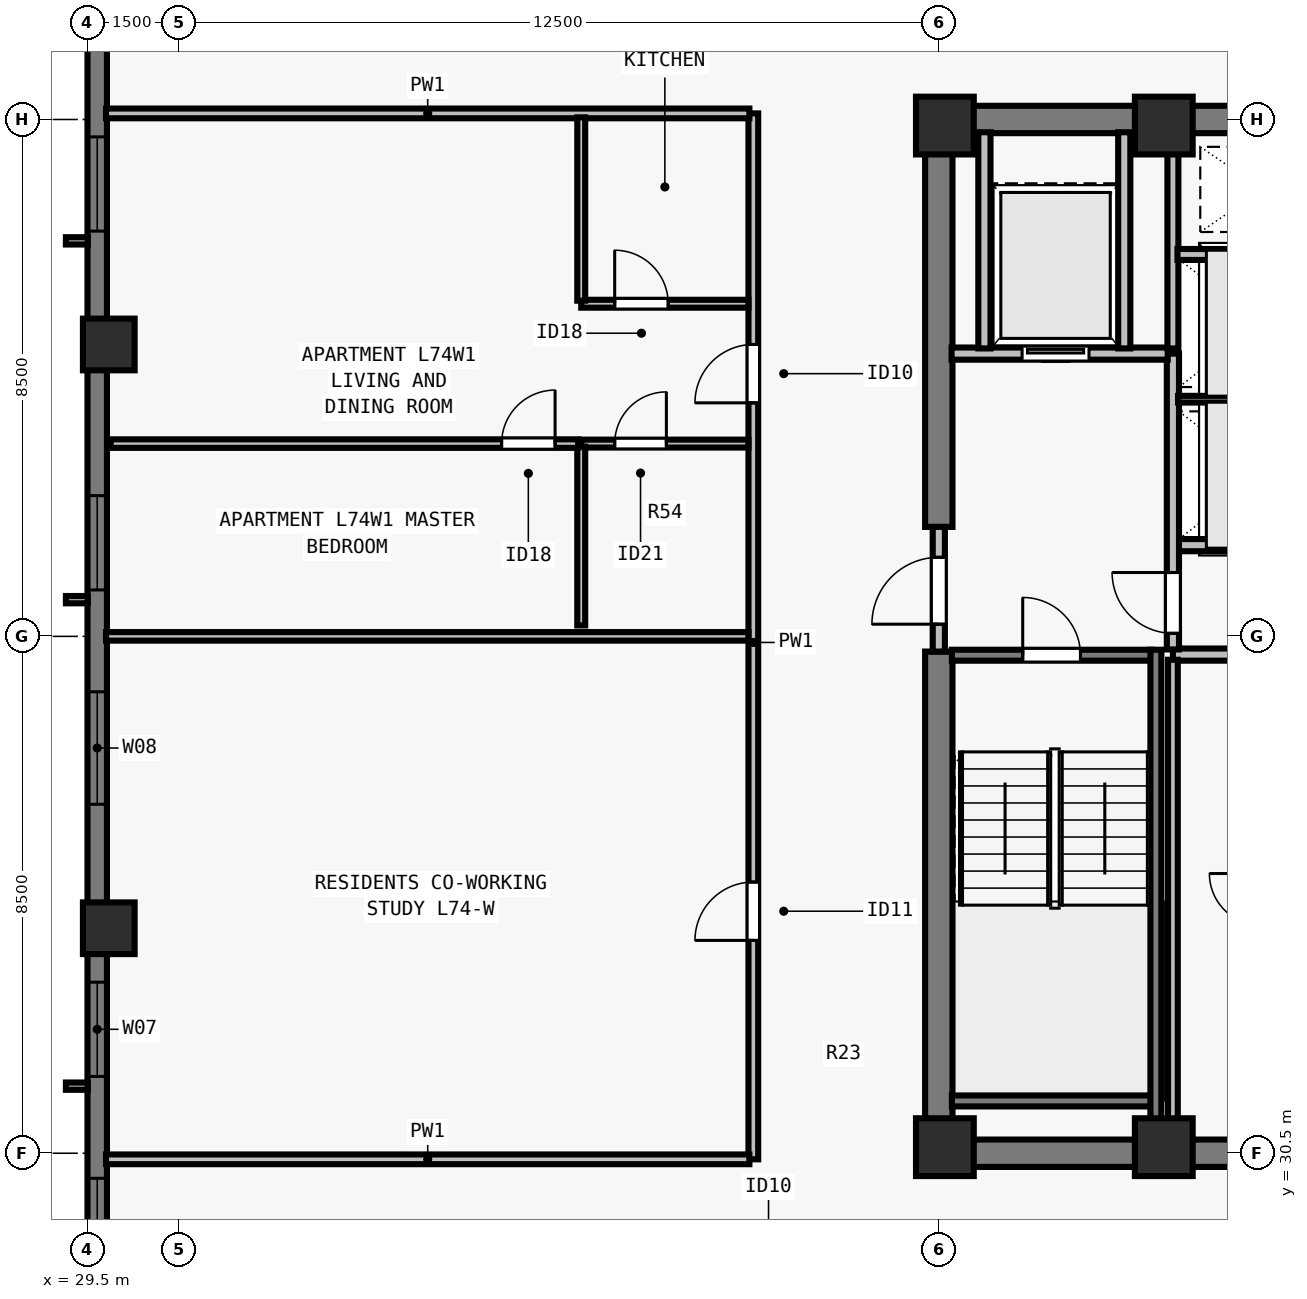
"""IFC4 building model, lengths in metres.
Left out: names, types, materials, properties, quantities, classifications, styles, units other than length and angle.
Written with IfcOpenShell. Run it as: python <this file> out.ifc"""

import sys

from ifc_helpers import new_model, si_unit, direction, frame, frame_2d, origin, origin_2d, place, context, subcontext, project, spatial, rectangle, extrude, element, fill, save


model = new_model("IFC4")
c1 = context("Model", 3, precision=1e-05, world=origin(), true_north=direction((0.0, 1.0)))
c2 = subcontext(c1, "Body", "Model", "MODEL_VIEW")
j1 = project(units=[si_unit("LENGTHUNIT", "METRE"), si_unit("PLANEANGLEUNIT", "RADIAN")], contexts=[c1])
p1 = place(None, origin())
s1 = spatial("IfcSite", under=j1, at=p1, CompositionType="ELEMENT")
p2 = place(p1, origin())
s2 = spatial("IfcBuilding", under=s1, at=p2, CompositionType="ELEMENT")
p3 = place(p2, frame((0.0, 0.0, 269.0)))
s3 = spatial("IfcBuildingStorey", under=s2, at=p3, CompositionType="ELEMENT", Elevation=269.0)
for number, where, z_axis, x_axis in (
    (1, (43.6, 30.6, 0.0), (0.0, 0.0, 1.0), (1.0, 0.0, 0.0)),
    (2, (47.2, 30.6, 0.0), (0.0, 0.0, 1.0), (1.0, 0.0, 0.0)),
    (3, (43.6, 47.4, 0.0), (0.0, 0.0, 1.0), (1.0, 0.0, 0.0)),
    (4, (47.2, 47.4, 0.0), (0.0, 0.0, 1.0), (1.0, 0.0, 0.0)),
):
    element("IfcColumn", number, at=place(p3, frame(where, z_axis=z_axis, x_axis=x_axis)), inside=s3, PredefinedType="COLUMN", context=c2, shape_type="SweptSolid", body=[
        extrude(rectangle(XDim=0.95, YDim=0.95, at=origin_2d()), origin(), (0.0, 0.0, 1.0), 3.5),
    ])
for number, where, z_axis, x_axis in (
    (5, (29.85, 43.8, 0.0), (0.0, 0.0, 1.0), (0.0, 1.0, 0.0)),
    (6, (29.85, 34.2, 0.0), (0.0, 0.0, 1.0), (0.0, 1.0, 0.0)),
):
    element("IfcColumn", number, at=place(p3, frame(where, z_axis=z_axis, x_axis=x_axis)), inside=s3, PredefinedType="COLUMN", context=c2, shape_type="SweptSolid", body=[
        extrude(rectangle(XDim=0.85, YDim=0.85, at=origin_2d()), origin(), (0.0, 0.0, 1.0), 3.5),
    ])
p4 = place(p3, frame((29.66, 21.5, 0.0), z_axis=(0.0, 0.0, 1.0), x_axis=(0.0, 1.0, 0.0)))
e7 = element("IfcWall", 7, at=p4, inside=s3, PredefinedType="SOLIDWALL", context=c2, shape_type="SweptSolid", body=[
    extrude(rectangle(XDim=34.702, YDim=0.32, at=frame_2d((17.351, 0.0))), origin(), (0.0, 0.0, 1.0), 3.29),
])
p5 = place(p4, frame((3.913, 0.0, 0.8)))
e8 = element("IfcOpeningElement", 8, at=p5, cuts=e7, PredefinedType="OPENING", context=c2, shape_type="SweptSolid", body=[
    extrude(rectangle(XDim=1.55, YDim=1.678, at=frame_2d((0.775, 0.839))), frame((0.0, 0.17, 0.0), z_axis=(0.0, -1.0, 0.0), x_axis=(1.0, 0.0, 0.0)), (0.0, 0.0, 1.0), 0.34),
])
p6 = place(p4, frame((6.738, 0.0, 0.8)))
e9 = element("IfcOpeningElement", 9, at=p6, cuts=e7, PredefinedType="OPENING", context=c2, shape_type="SweptSolid", body=[
    extrude(rectangle(XDim=1.85, YDim=1.678, at=frame_2d((0.925, 0.839))), frame((0.0, 0.17, 0.0), z_axis=(0.0, -1.0, 0.0), x_axis=(1.0, 0.0, 0.0)), (0.0, 0.0, 1.0), 0.34),
])
p7 = place(p4, frame((10.263, 0.0, 0.8)))
e10 = element("IfcOpeningElement", 10, at=p7, cuts=e7, PredefinedType="OPENING", context=c2, shape_type="SweptSolid", body=[
    extrude(rectangle(XDim=1.55, YDim=1.678, at=frame_2d((0.775, 0.839))), frame((0.0, 0.17, 0.0), z_axis=(0.0, -1.0, 0.0), x_axis=(1.0, 0.0, 0.0)), (0.0, 0.0, 1.0), 0.34),
])
p8 = place(p4, frame((14.738, 0.0, 0.8)))
e11 = element("IfcOpeningElement", 11, at=p8, cuts=e7, PredefinedType="OPENING", context=c2, shape_type="SweptSolid", body=[
    extrude(rectangle(XDim=1.85, YDim=1.678, at=frame_2d((0.925, 0.839))), frame((0.0, 0.17, 0.0), z_axis=(0.0, -1.0, 0.0), x_axis=(1.0, 0.0, 0.0)), (0.0, 0.0, 1.0), 0.34),
])
p9 = place(p4, frame((18.264, 0.0, 0.8)))
e12 = element("IfcOpeningElement", 12, at=p9, cuts=e7, PredefinedType="OPENING", context=c2, shape_type="SweptSolid", body=[
    extrude(rectangle(XDim=1.55, YDim=1.678, at=frame_2d((0.775, 0.839))), frame((0.0, 0.17, 0.0), z_axis=(0.0, -1.0, 0.0), x_axis=(1.0, 0.0, 0.0)), (0.0, 0.0, 1.0), 0.34),
])
p10 = place(p4, frame((24.164, 0.0, 0.8)))
e13 = element("IfcOpeningElement", 13, at=p10, cuts=e7, PredefinedType="OPENING", context=c2, shape_type="SweptSolid", body=[
    extrude(rectangle(XDim=1.55, YDim=1.678, at=frame_2d((0.775, 0.839))), frame((0.0, 0.17, 0.0), z_axis=(0.0, -1.0, 0.0), x_axis=(1.0, 0.0, 0.0)), (0.0, 0.0, 1.0), 0.34),
])
for number, where, z_axis, x_axis in (
    (14, (43.275, 30.5, 0.0), (0.0, 0.0, 1.0), (1.0, 0.0, 0.0)),
    (15, (43.275, 47.5, 0.0), (0.0, 0.0, 1.0), (1.0, 0.0, 0.0)),
):
    element("IfcWall", number, at=place(p3, frame(where, z_axis=z_axis, x_axis=x_axis)), inside=s3, PredefinedType="SHEAR", context=c2, shape_type="SweptSolid", body=[
        extrude(rectangle(XDim=17.45, YDim=0.45, at=frame_2d((8.725, 0.0))), origin(), (0.0, 0.0, 1.0), 3.29),
    ])
p11 = place(p3, frame((43.5, 30.715, 0.0), z_axis=(0.0, 0.0, 1.0), x_axis=(0.0, 1.0, 0.0)))
e16 = element("IfcWall", 16, at=p11, inside=s3, PredefinedType="SHEAR", context=c2, shape_type="SweptSolid", body=[
    extrude(rectangle(XDim=8.035, YDim=0.45, at=frame_2d((4.018, 0.0))), origin(), (0.0, 0.0, 1.0), 3.29),
])
p12 = place(p3, frame((43.5, 40.8, 0.0), z_axis=(0.0, 0.0, 1.0), x_axis=(0.0, 1.0, 0.0)))
e17 = element("IfcWall", 17, at=p12, inside=s3, PredefinedType="SHEAR", context=c2, shape_type="SweptSolid", body=[
    extrude(rectangle(XDim=6.485, YDim=0.45, at=frame_2d((3.242, 0.0))), origin(), (0.0, 0.0, 1.0), 3.29),
])
for number, where, z_axis, x_axis in (
    (18, (47.35, 38.7, 0.0), (0.0, 0.0, 1.0), (1.0, 0.0, 0.0)),
    (19, (47.35, 40.5, 0.0), (0.0, 0.0, 1.0), (1.0, 0.0, 0.0)),
):
    element("IfcWall", number, at=place(p3, frame(where, z_axis=z_axis, x_axis=x_axis)), inside=s3, PredefinedType="SOLIDWALL", context=c2, shape_type="SweptSolid", body=[
        extrude(rectangle(XDim=2.95, YDim=0.2, at=frame_2d((1.475, 0.0))), origin(), (0.0, 0.0, 1.0), 3.29),
    ])
p13 = place(p3, frame((43.5, 38.75, 0.0), z_axis=(0.0, 0.0, 1.0), x_axis=(0.0, 1.0, 0.0)))
e20 = element("IfcWall", 20, at=p13, inside=s3, PredefinedType="SOLIDWALL", context=c2, shape_type="SweptSolid", body=[
    extrude(rectangle(XDim=2.05, YDim=0.2, at=frame_2d((1.025, 0.0))), origin(), (0.0, 0.0, 1.0), 3.29),
])
p14 = place(p13, frame((0.45, 0.0, 0.0)))
e21 = element("IfcOpeningElement", 21, at=p14, cuts=e20, PredefinedType="OPENING", context=c2, shape_type="SweptSolid", body=[
    extrude(rectangle(XDim=1.1, YDim=2.15, at=frame_2d((0.55, 1.075))), frame((0.0, 0.11, 0.0), z_axis=(0.0, -1.0, 0.0), x_axis=(1.0, 0.0, 0.0)), (0.0, 0.0, 1.0), 0.22),
])
p15 = place(p3, frame((47.35, 38.785, 0.0), z_axis=(0.0, 0.0, 1.0), x_axis=(0.0, 1.0, 0.0)))
e22 = element("IfcWall", 22, at=p15, inside=s3, PredefinedType="SOLIDWALL", context=c2, shape_type="SweptSolid", body=[
    extrude(rectangle(XDim=4.865, YDim=0.2, at=frame_2d((2.433, 0.0))), origin(), (0.0, 0.0, 1.0), 3.29),
])
p16 = place(p15, frame((0.265, 0.0, 0.0)))
e23 = element("IfcOpeningElement", 23, at=p16, cuts=e22, PredefinedType="OPENING", context=c2, shape_type="SweptSolid", body=[
    extrude(rectangle(XDim=1.0, YDim=2.15, at=frame_2d((0.5, 1.075))), frame((0.0, 0.11, 0.0), z_axis=(0.0, -1.0, 0.0), x_axis=(1.0, 0.0, 0.0)), (0.0, 0.0, 1.0), 0.22),
])
p17 = place(p3, frame((43.71, 43.65, 0.0), z_axis=(0.0, 0.0, 1.0), x_axis=(1.0, 0.0, 0.0)))
e24 = element("IfcWall", 24, at=p17, inside=s3, PredefinedType="SOLIDWALL", context=c2, shape_type="SweptSolid", body=[
    extrude(rectangle(XDim=3.555, YDim=0.2, at=frame_2d((1.777, 0.0))), origin(), (0.0, 0.0, 1.0), 3.29),
])
p18 = place(p17, frame((1.16, 0.0, 0.0)))
e25 = element("IfcOpeningElement", 25, at=p18, cuts=e24, PredefinedType="OPENING", context=c2, shape_type="SweptSolid", body=[
    extrude(rectangle(XDim=1.1, YDim=2.2, at=frame_2d((0.55, 1.1))), frame((0.0, 0.11, 0.0), z_axis=(0.0, -1.0, 0.0), x_axis=(1.0, 0.0, 0.0)), (0.0, 0.0, 1.0), 0.22),
])
for number, where, z_axis, x_axis in (
    (26, (46.55, 43.735, 0.0), (0.0, 0.0, 1.0), (0.0, 1.0, 0.0)),
    (27, (44.25, 43.735, 0.0), (0.0, 0.0, 1.0), (0.0, 1.0, 0.0)),
):
    element("IfcWall", number, at=place(p3, frame(where, z_axis=z_axis, x_axis=x_axis)), inside=s3, PredefinedType="SOLIDWALL", context=c2, shape_type="SweptSolid", body=[
        extrude(rectangle(XDim=3.555, YDim=0.2, at=frame_2d((1.777, 0.0))), origin(), (0.0, 0.0, 1.0), 3.29),
    ])
p19 = place(p3, frame((47.35, 30.71, 0.0), z_axis=(0.0, 0.0, 1.0), x_axis=(0.0, 1.0, 0.0)))
e28 = element("IfcWall", 28, at=p19, inside=s3, PredefinedType="PARTITIONING", context=c2, shape_type="SweptSolid", body=[
    extrude(rectangle(XDim=7.905, YDim=0.16, at=frame_2d((3.953, 0.0))), origin(), (0.0, 0.0, 1.0), 3.29),
])
p20 = place(p3, frame((47.35, 43.735, 0.0), z_axis=(0.0, 0.0, 1.0), x_axis=(0.0, 1.0, 0.0)))
e29 = element("IfcWall", 29, at=p20, inside=s3, PredefinedType="SOLIDWALL", context=c2, shape_type="SweptSolid", body=[
    extrude(rectangle(XDim=3.555, YDim=0.18, at=frame_2d((1.777, 0.0))), origin(), (0.0, 0.0, 1.0), 3.29),
])
p21 = place(p3, frame((47.435, 42.9, 0.0), z_axis=(0.0, 0.0, 1.0), x_axis=(1.0, 0.0, 0.0)))
e30 = element("IfcWall", 30, at=p21, inside=s3, PredefinedType="PARTITIONING", context=c2, shape_type="SweptSolid", body=[
    extrude(rectangle(XDim=2.78, YDim=0.11, at=frame_2d((1.39, 0.0))), origin(), (0.0, 0.0, 1.0), 3.29),
])
p22 = place(p3, frame((47.425, 45.28, 0.0), z_axis=(0.0, 0.0, 1.0), x_axis=(1.0, 0.0, 0.0)))
e31 = element("IfcWall", 31, at=p22, inside=s3, PredefinedType="SOLIDWALL", context=c2, shape_type="SweptSolid", body=[
    extrude(rectangle(XDim=2.79, YDim=0.18, at=frame_2d((1.395, 0.0))), origin(), (0.0, 0.0, 1.0), 3.29),
])
p23 = place(p3, frame((40.45, 30.4, 0.0), z_axis=(0.0, 0.0, 1.0), x_axis=(0.0, 1.0, 0.0)))
e32 = element("IfcWall", 32, at=p23, inside=s3, PredefinedType="PARTITIONING", context=c2, shape_type="SweptSolid", body=[
    extrude(rectangle(XDim=17.2, YDim=0.16, at=frame_2d((8.6, 0.0))), origin(), (0.0, 0.0, 1.0), 3.29),
])
p24 = place(p23, frame((3.6, 0.0, 0.0)))
e33 = element("IfcOpeningElement", 33, at=p24, cuts=e32, PredefinedType="OPENING", context=c2, shape_type="SweptSolid", body=[
    extrude(rectangle(XDim=0.96, YDim=2.12, at=frame_2d((0.48, 1.06))), frame((0.0, 0.09, 0.0), z_axis=(0.0, -1.0, 0.0), x_axis=(1.0, 0.0, 0.0)), (0.0, 0.0, 1.0), 0.18),
])
p25 = place(p23, frame((12.44, 0.0, 0.0)))
e34 = element("IfcOpeningElement", 34, at=p25, cuts=e32, PredefinedType="OPENING", context=c2, shape_type="SweptSolid", body=[
    extrude(rectangle(XDim=0.96, YDim=2.18, at=frame_2d((0.48, 1.09))), frame((0.0, 0.09, 0.0), z_axis=(0.0, -1.0, 0.0), x_axis=(1.0, 0.0, 0.0)), (0.0, 0.0, 1.0), 0.18),
])
for number, where, z_axis, x_axis in (
    (35, (29.805, 30.4, 0.0), (0.0, 0.0, 1.0), (1.0, 0.0, 0.0)),
    (36, (29.805, 47.6, 0.0), (0.0, 0.0, 1.0), (1.0, 0.0, 0.0)),
):
    element("IfcWall", number, at=place(p3, frame(where, z_axis=z_axis, x_axis=x_axis)), inside=s3, PredefinedType="PARTITIONING", context=c2, shape_type="SweptSolid", body=[
        extrude(rectangle(XDim=10.58, YDim=0.16, at=frame_2d((5.29, 0.0))), origin(), (0.0, 0.0, 1.0), 3.29),
    ])
p26 = place(p3, frame((29.805, 39.0, 0.0), z_axis=(0.0, 0.0, 1.0), x_axis=(1.0, 0.0, 0.0)))
e37 = element("IfcWall", 37, at=p26, inside=s3, PredefinedType="PARTITIONING", context=c2, shape_type="SweptSolid", body=[
    extrude(rectangle(XDim=10.565, YDim=0.14, at=frame_2d((5.283, 0.0))), origin(), (0.0, 0.0, 1.0), 2.958),
])
p27 = place(p3, frame((37.62, 42.17, 0.0), z_axis=(0.0, 0.0, 1.0), x_axis=(1.0, 0.0, 0.0)))
e38 = element("IfcWall", 38, at=p27, inside=s3, PredefinedType="PLUMBINGWALL", context=c2, shape_type="SweptSolid", body=[
    extrude(rectangle(XDim=2.75, YDim=0.13, at=frame_2d((1.375, 0.0))), origin(), (0.0, 0.0, 1.0), 2.958),
])
p28 = place(p27, frame((0.55, 0.0, 0.0)))
e39 = element("IfcOpeningElement", 39, at=p28, cuts=e38, PredefinedType="OPENING", context=c2, shape_type="SweptSolid", body=[
    extrude(rectangle(XDim=0.85, YDim=2.08, at=frame_2d((0.425, 1.04))), frame((0.0, 0.075, 0.0), z_axis=(0.0, -1.0, 0.0), x_axis=(1.0, 0.0, 0.0)), (0.0, 0.0, 1.0), 0.15),
])
p29 = place(p3, frame((37.62, 39.18, 0.0), z_axis=(0.0, 0.0, 1.0), x_axis=(0.0, 1.0, 0.0)))
e40 = element("IfcWall", 40, at=p29, inside=s3, PredefinedType="PLUMBINGWALL", context=c2, shape_type="SweptSolid", body=[
    extrude(rectangle(XDim=2.94, YDim=0.13, at=frame_2d((1.47, 0.0))), origin(), (0.0, 0.0, 1.0), 3.29),
])
p30 = place(p3, frame((37.62, 44.47, 0.0), z_axis=(0.0, 0.0, 1.0), x_axis=(1.0, 0.0, 0.0)))
e41 = element("IfcWall", 41, at=p30, inside=s3, PredefinedType="PLUMBINGWALL", context=c2, shape_type="SweptSolid", body=[
    extrude(rectangle(XDim=2.75, YDim=0.13, at=frame_2d((1.375, 0.0))), origin(), (0.0, 0.0, 1.0), 3.29),
])
p31 = place(p30, frame((0.55, 0.0, 0.0)))
e42 = element("IfcOpeningElement", 42, at=p31, cuts=e41, PredefinedType="OPENING", context=c2, shape_type="SweptSolid", body=[
    extrude(rectangle(XDim=0.88, YDim=2.1, at=frame_2d((0.44, 1.05))), frame((0.0, 0.075, 0.0), z_axis=(0.0, -1.0, 0.0), x_axis=(1.0, 0.0, 0.0)), (0.0, 0.0, 1.0), 0.15),
])
p32 = place(p3, frame((37.62, 44.52, 0.0), z_axis=(0.0, 0.0, 1.0), x_axis=(0.0, 1.0, 0.0)))
e43 = element("IfcWall", 43, at=p32, inside=s3, PredefinedType="PLUMBINGWALL", context=c2, shape_type="SweptSolid", body=[
    extrude(rectangle(XDim=3.015, YDim=0.13, at=frame_2d((1.507, 0.0))), origin(), (0.0, 0.0, 1.0), 3.29),
])
p33 = place(p3, frame((29.88, 42.17, 0.0), z_axis=(0.0, 0.0, 1.0), x_axis=(1.0, 0.0, 0.0)))
e44 = element("IfcWall", 44, at=p33, inside=s3, PredefinedType="PARTITIONING", context=c2, shape_type="SweptSolid", body=[
    extrude(rectangle(XDim=7.69, YDim=0.14, at=frame_2d((3.845, 0.0))), origin(), (0.0, 0.0, 1.0), 3.29),
])
p34 = place(p33, frame((6.43, 0.0, 0.0)))
e45 = element("IfcOpeningElement", 45, at=p34, cuts=e44, PredefinedType="OPENING", context=c2, shape_type="SweptSolid", body=[
    extrude(rectangle(XDim=0.88, YDim=2.1, at=frame_2d((0.44, 1.05))), frame((0.0, 0.08, 0.0), z_axis=(0.0, -1.0, 0.0), x_axis=(1.0, 0.0, 0.0)), (0.0, 0.0, 1.0), 0.16),
])
p35 = place(p3, frame((43.715, 38.69, 0.0), z_axis=(0.0, 0.0, 1.0), x_axis=(1.0, 0.0, 0.0)))
e46 = element("IfcWall", 46, at=p35, inside=s3, PredefinedType="SOLIDWALL", context=c2, shape_type="SweptSolid", body=[
    extrude(rectangle(XDim=3.28, YDim=0.18, at=frame_2d((1.64, 0.0))), origin(), (0.0, 0.0, 1.0), 3.29),
])
p36 = place(p35, frame((1.165, 0.0, 0.0)))
e47 = element("IfcOpeningElement", 47, at=p36, cuts=e46, PredefinedType="OPENING", context=c2, shape_type="SweptSolid", body=[
    extrude(rectangle(XDim=0.95, YDim=2.15, at=frame_2d((0.475, 1.075))), frame((0.0, 0.1, 0.0), z_axis=(0.0, -1.0, 0.0), x_axis=(1.0, 0.0, 0.0)), (0.0, 0.0, 1.0), 0.2),
])
p37 = place(p3, frame((43.715, 31.36, 0.0), z_axis=(0.0, 0.0, 1.0), x_axis=(1.0, 0.0, 0.0)))
e48 = element("IfcWall", 48, at=p37, inside=s3, PredefinedType="SOLIDWALL", context=c2, shape_type="SweptSolid", body=[
    extrude(rectangle(XDim=3.28, YDim=0.18, at=frame_2d((1.64, 0.0))), origin(), (0.0, 0.0, 1.0), 3.29),
])
p38 = place(p3, frame((47.07, 38.78, 0.0), z_axis=(0.0, 0.0, 1.0), x_axis=(0.0, -1.0, 0.0)))
e49 = element("IfcWall", 49, at=p38, inside=s3, PredefinedType="SOLIDWALL", context=c2, shape_type="SweptSolid", body=[
    extrude(rectangle(XDim=8.067, YDim=0.18, at=frame_2d((4.034, 0.0))), origin(), (0.0, 0.0, 1.0), 3.29),
])
p39 = place(p6, origin())
e50 = element("IfcWindow", 50, at=p39, inside=s3, PartitioningType="SINGLE_PANEL", PredefinedType="WINDOW", context=c2, shape_type="SweptSolid", body=[
    extrude(rectangle(XDim=1.85, YDim=1.678, at=frame_2d((0.925, 0.839))), frame((0.0, -0.05, 0.0), z_axis=(0.0, -1.0, 0.0), x_axis=(1.0, 0.0, 0.0)), (0.0, 0.0, 1.0), 0.06),
])
fill(e9, e50)
p40 = place(p7, origin())
e51 = element("IfcWindow", 51, at=p40, inside=s3, PartitioningType="SINGLE_PANEL", PredefinedType="WINDOW", context=c2, shape_type="SweptSolid", body=[
    extrude(rectangle(XDim=1.55, YDim=1.678, at=frame_2d((0.775, 0.839))), frame((0.0, -0.05, 0.0), z_axis=(0.0, -1.0, 0.0), x_axis=(1.0, 0.0, 0.0)), (0.0, 0.0, 1.0), 0.06),
])
fill(e10, e51)
p41 = place(p8, origin())
e52 = element("IfcWindow", 52, at=p41, inside=s3, PartitioningType="SINGLE_PANEL", PredefinedType="WINDOW", context=c2, shape_type="SweptSolid", body=[
    extrude(rectangle(XDim=1.85, YDim=1.678, at=frame_2d((0.925, 0.839))), frame((0.0, -0.05, 0.0), z_axis=(0.0, -1.0, 0.0), x_axis=(1.0, 0.0, 0.0)), (0.0, 0.0, 1.0), 0.06),
])
fill(e11, e52)
p42 = place(p9, origin())
e53 = element("IfcWindow", 53, at=p42, inside=s3, PartitioningType="SINGLE_PANEL", PredefinedType="WINDOW", context=c2, shape_type="SweptSolid", body=[
    extrude(rectangle(XDim=1.55, YDim=1.678, at=frame_2d((0.775, 0.839))), frame((0.0, -0.05, 0.0), z_axis=(0.0, -1.0, 0.0), x_axis=(1.0, 0.0, 0.0)), (0.0, 0.0, 1.0), 0.06),
])
fill(e12, e53)
p43 = place(p10, origin())
e54 = element("IfcWindow", 54, at=p43, inside=s3, PartitioningType="SINGLE_PANEL", PredefinedType="WINDOW", context=c2, shape_type="SweptSolid", body=[
    extrude(rectangle(XDim=1.55, YDim=1.678, at=frame_2d((0.775, 0.839))), frame((0.0, -0.05, 0.0), z_axis=(0.0, -1.0, 0.0), x_axis=(1.0, 0.0, 0.0)), (0.0, 0.0, 1.0), 0.06),
])
fill(e13, e54)
p44 = place(p14, origin())
e55 = element("IfcDoor", 55, at=p44, inside=s3, OperationType="SINGLE_SWING_LEFT", PredefinedType="DOOR", context=c2, shape_type="SweptSolid", body=[
    extrude(rectangle(XDim=1.1, YDim=2.15, at=frame_2d((0.55, 1.075))), frame((0.0, 0.025, 0.0), z_axis=(0.0, -1.0, 0.0), x_axis=(1.0, 0.0, 0.0)), (0.0, 0.0, 1.0), 0.05),
])
fill(e21, e55)
p45 = place(p16, origin())
e56 = element("IfcDoor", 56, at=p45, inside=s3, OperationType="SINGLE_SWING_RIGHT", PredefinedType="DOOR", context=c2, shape_type="SweptSolid", body=[
    extrude(rectangle(XDim=1.0, YDim=2.15, at=frame_2d((0.5, 1.075))), frame((0.0, 0.025, 0.0), z_axis=(0.0, -1.0, 0.0), x_axis=(1.0, 0.0, 0.0)), (0.0, 0.0, 1.0), 0.05),
])
fill(e23, e56)
p46 = place(p18, origin())
e57 = element("IfcDoor", 57, at=p46, inside=s3, OperationType="SLIDING_TO_LEFT", PredefinedType="DOOR", context=c2, shape_type="SweptSolid", body=[
    extrude(rectangle(XDim=1.1, YDim=2.2, at=frame_2d((0.55, 1.1))), frame((0.0, 0.025, 0.0), z_axis=(0.0, -1.0, 0.0), x_axis=(1.0, 0.0, 0.0)), (0.0, 0.0, 1.0), 0.05),
])
fill(e25, e57)
p47 = place(p24, origin())
e58 = element("IfcDoor", 58, at=p47, inside=s3, OperationType="SINGLE_SWING_LEFT", PredefinedType="DOOR", context=c2, shape_type="SweptSolid", body=[
    extrude(rectangle(XDim=0.96, YDim=2.12, at=frame_2d((0.48, 1.06))), frame((0.0, 0.025, 0.0), z_axis=(0.0, -1.0, 0.0), x_axis=(1.0, 0.0, 0.0)), (0.0, 0.0, 1.0), 0.05),
])
fill(e33, e58)
p48 = place(p28, origin())
e59 = element("IfcDoor", 59, at=p48, inside=s3, OperationType="SINGLE_SWING_RIGHT", PredefinedType="DOOR", context=c2, shape_type="SweptSolid", body=[
    extrude(rectangle(XDim=0.85, YDim=2.08, at=frame_2d((0.425, 1.04))), frame((0.0, 0.025, 0.0), z_axis=(0.0, -1.0, 0.0), x_axis=(1.0, 0.0, 0.0)), (0.0, 0.0, 1.0), 0.05),
])
fill(e39, e59)
p49 = place(p31, origin())
e60 = element("IfcDoor", 60, at=p49, inside=s3, OperationType="SINGLE_SWING_LEFT", PredefinedType="DOOR", context=c2, shape_type="SweptSolid", body=[
    extrude(rectangle(XDim=0.88, YDim=2.1, at=frame_2d((0.44, 1.05))), frame((0.0, 0.025, 0.0), z_axis=(0.0, -1.0, 0.0), x_axis=(1.0, 0.0, 0.0)), (0.0, 0.0, 1.0), 0.05),
])
fill(e42, e60)
p50 = place(p34, origin())
e61 = element("IfcDoor", 61, at=p50, inside=s3, OperationType="SINGLE_SWING_RIGHT", PredefinedType="DOOR", context=c2, shape_type="SweptSolid", body=[
    extrude(rectangle(XDim=0.88, YDim=2.1, at=frame_2d((0.44, 1.05))), frame((0.0, 0.025, 0.0), z_axis=(0.0, -1.0, 0.0), x_axis=(1.0, 0.0, 0.0)), (0.0, 0.0, 1.0), 0.05),
])
fill(e45, e61)
p51 = place(p25, origin())
e62 = element("IfcDoor", 62, at=p51, inside=s3, OperationType="SINGLE_SWING_LEFT", PredefinedType="DOOR", context=c2, shape_type="SweptSolid", body=[
    extrude(rectangle(XDim=0.96, YDim=2.18, at=frame_2d((0.48, 1.09))), frame((0.0, 0.025, 0.0), z_axis=(0.0, -1.0, 0.0), x_axis=(1.0, 0.0, 0.0)), (0.0, 0.0, 1.0), 0.05),
])
fill(e34, e62)
p52 = place(p36, origin())
e63 = element("IfcDoor", 63, at=p52, inside=s3, OperationType="SINGLE_SWING_LEFT", PredefinedType="DOOR", context=c2, shape_type="SweptSolid", body=[
    extrude(rectangle(XDim=0.95, YDim=2.15, at=frame_2d((0.475, 1.075))), frame((0.0, 0.025, 0.0), z_axis=(0.0, -1.0, 0.0), x_axis=(1.0, 0.0, 0.0)), (0.0, 0.0, 1.0), 0.05),
])
fill(e47, e63)
save(model, sys.argv[1])
